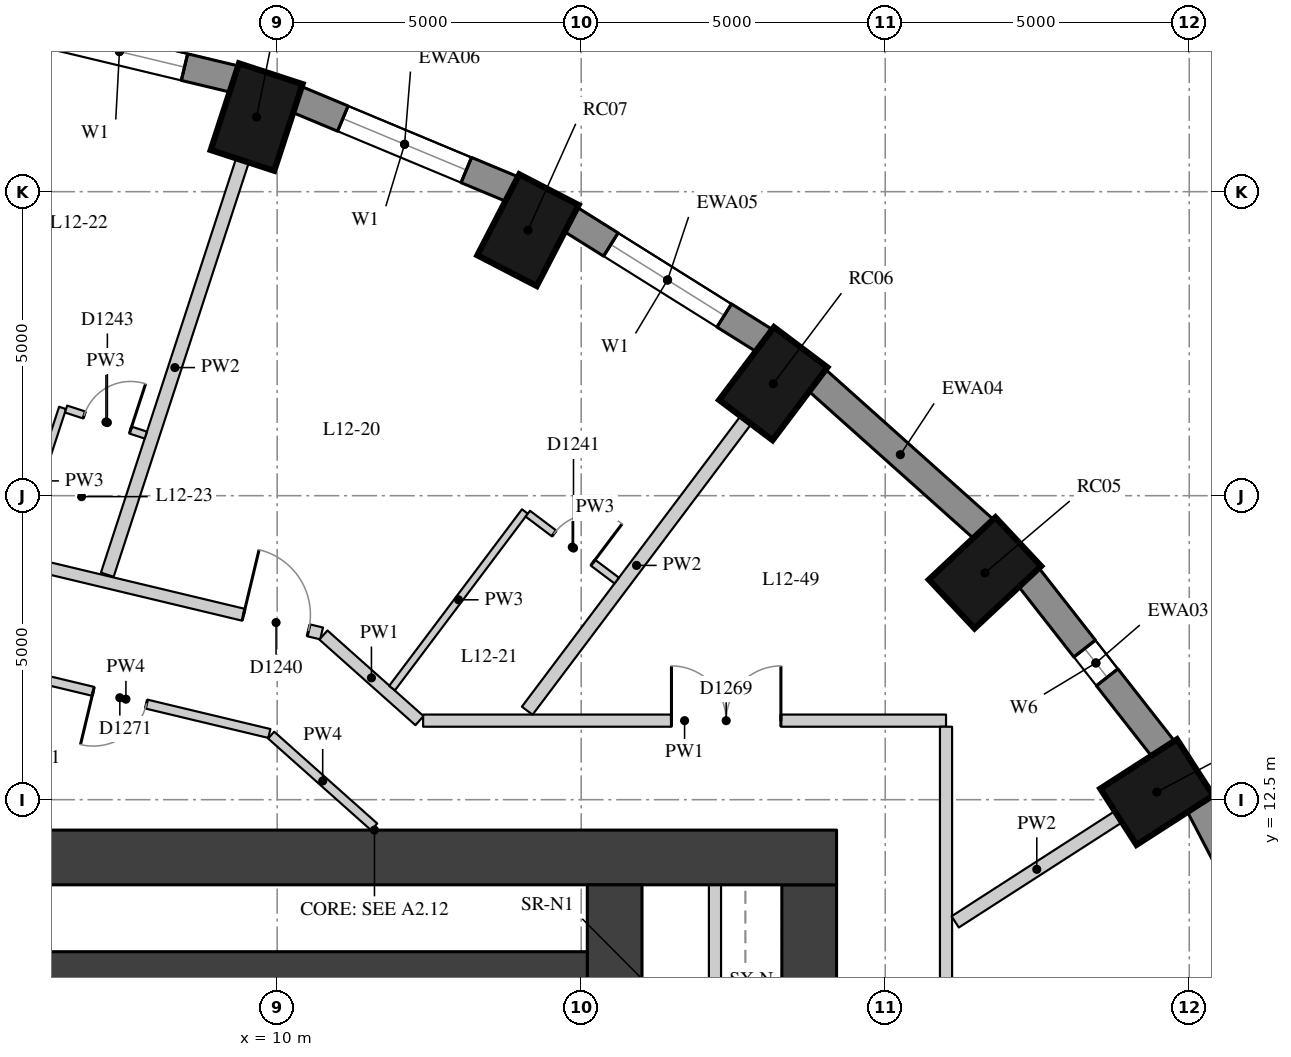
"""IFC4 building model, lengths in metres.
Left out: names, types, materials, properties, quantities, classifications, styles, units other than length and angle.
Written with IfcOpenShell. Run it as: python <this file> out.ifc"""

import sys

from ifc_helpers import new_model, si_unit, direction, frame, frame_2d, origin, origin_2d, place, context, subcontext, project, spatial, rectangle, extrude, element, fill, save


model = new_model("IFC4")
c1 = context("Model", 3, precision=1e-05, world=origin(), true_north=direction((0.0, 1.0)))
c2 = subcontext(c1, "Body", "Model", "MODEL_VIEW")
j1 = project(units=[si_unit("LENGTHUNIT", "METRE"), si_unit("PLANEANGLEUNIT", "RADIAN")], contexts=[c1])
p1 = place(None, origin())
s1 = spatial("IfcSite", under=j1, at=p1, CompositionType="ELEMENT")
p2 = place(p1, origin())
s2 = spatial("IfcBuilding", under=s1, at=p2, CompositionType="ELEMENT")
p3 = place(p2, frame((0.0, 0.0, 48.1)))
s3 = spatial("IfcBuildingStorey", under=s2, at=p3, CompositionType="ELEMENT", Elevation=48.1)
for number, where, z_axis, x_axis in (
    (1, (24.465, 12.625, 0.0), (0.0, 0.0, 1.0), (0.841, 0.541, 0.0)),
    (2, (21.641, 16.23, 0.0), (0.0, 0.0, 1.0), (0.73, 0.683, 0.0)),
    (3, (18.159, 19.343, 0.0), (0.0, 0.0, 1.0), (0.601, 0.799, 0.0)),
    (4, (14.125, 21.867, 0.0), (0.0, 0.0, 1.0), (0.46, 0.888, 0.0)),
    (5, (9.662, 23.727, 0.0), (0.0, 0.0, 1.0), (0.31, 0.951, 0.0)),
):
    element("IfcColumn", number, at=place(p3, frame(where, z_axis=z_axis, x_axis=x_axis)), inside=s3, PredefinedType="COLUMN", context=c2, shape_type="SweptSolid", body=[
        extrude(rectangle(XDim=1.5, YDim=1.1, at=origin_2d()), origin(), (0.0, 0.0, 1.0), 3.3),
    ])
p4 = place(p3, frame((26.786, 9.305, 0.0), z_axis=(0.0, 0.0, 1.0), x_axis=(-0.462492775226, 0.886623050041, 0.0)))
e6 = element("IfcWall", 6, at=p4, inside=s3, PredefinedType="SOLIDWALL", context=c2, shape_type="SweptSolid", body=[
    extrude(rectangle(XDim=3.532, YDim=0.45, at=frame_2d((1.766, 0.0))), origin(), (0.0, 0.0, 1.0), 3.02),
])
p5 = place(p3, frame((24.578, 13.328, 0.0), z_axis=(0.0, 0.0, 1.0), x_axis=(-0.616661975264, 0.787228053529, 0.0)))
e7 = element("IfcWall", 7, at=p5, inside=s3, PredefinedType="SOLIDWALL", context=c2, shape_type="SweptSolid", body=[
    extrude(rectangle(XDim=3.61, YDim=0.45, at=frame_2d((1.805, 0.0))), origin(), (0.0, 0.0, 1.0), 3.02),
])
p6 = place(p5, frame((1.505, 0.0, 0.4)))
e8 = element("IfcOpeningElement", 8, at=p6, cuts=e7, PredefinedType="OPENING", context=c2, shape_type="SweptSolid", body=[
    extrude(rectangle(XDim=0.6, YDim=1.75, at=frame_2d((0.3, 0.875))), frame((0.0, 0.235, 0.0), z_axis=(0.0, -1.0, 0.0), x_axis=(1.0, 0.0, 0.0)), (0.0, 0.0, 1.0), 0.47),
])
p7 = place(p3, frame((21.627, 16.943, 0.0), z_axis=(0.0, 0.0, 1.0), x_axis=(-0.745526233716, 0.66647628228, 0.0)))
e9 = element("IfcWall", 9, at=p7, inside=s3, PredefinedType="SOLIDWALL", context=c2, shape_type="SweptSolid", body=[
    extrude(rectangle(XDim=3.697, YDim=0.45, at=frame_2d((1.848, 0.0))), origin(), (0.0, 0.0, 1.0), 3.02),
])
p8 = place(p3, frame((18.023, 20.044, 0.0), z_axis=(0.0, 0.0, 1.0), x_axis=(-0.847635480093, 0.530579016629, 0.0)))
e10 = element("IfcWall", 10, at=p8, inside=s3, PredefinedType="SOLIDWALL", context=c2, shape_type="SweptSolid", body=[
    extrude(rectangle(XDim=3.782, YDim=0.45, at=frame_2d((1.891, 0.0))), origin(), (0.0, 0.0, 1.0), 3.02),
])
p9 = place(p8, frame((0.791, 0.0, 0.4)))
e11 = element("IfcOpeningElement", 11, at=p9, cuts=e10, PredefinedType="OPENING", context=c2, shape_type="SweptSolid", body=[
    extrude(rectangle(XDim=2.2, YDim=1.75, at=frame_2d((1.1, 0.875))), frame((0.0, 0.235, 0.0), z_axis=(0.0, -1.0, 0.0), x_axis=(1.0, 0.0, 0.0)), (0.0, 0.0, 1.0), 0.47),
])
p10 = place(p3, frame((13.875, 22.537, 0.0), z_axis=(0.0, 0.0, 1.0), x_axis=(-0.923031964282, 0.384723267966, 0.0)))
e12 = element("IfcWall", 12, at=p10, inside=s3, PredefinedType="SOLIDWALL", context=c2, shape_type="SweptSolid", body=[
    extrude(rectangle(XDim=3.856, YDim=0.45, at=frame_2d((1.928, 0.0))), origin(), (0.0, 0.0, 1.0), 3.02),
])
p11 = place(p10, frame((0.828, 0.0, 0.4)))
e13 = element("IfcOpeningElement", 13, at=p11, cuts=e12, PredefinedType="OPENING", context=c2, shape_type="SweptSolid", body=[
    extrude(rectangle(XDim=2.2, YDim=1.75, at=frame_2d((1.1, 0.875))), frame((0.0, 0.235, 0.0), z_axis=(0.0, -1.0, 0.0), x_axis=(1.0, 0.0, 0.0)), (0.0, 0.0, 1.0), 0.47),
])
p12 = place(p3, frame((9.308, 24.35, 0.0), z_axis=(0.0, 0.0, 1.0), x_axis=(-0.972496561493, 0.232917233979, 0.0)))
e14 = element("IfcWall", 14, at=p12, inside=s3, PredefinedType="SOLIDWALL", context=c2, shape_type="SweptSolid", body=[
    extrude(rectangle(XDim=3.911, YDim=0.45, at=frame_2d((1.956, 0.0))), origin(), (0.0, 0.0, 1.0), 3.02),
])
p13 = place(p12, frame((0.855, 0.0, 0.4)))
e15 = element("IfcOpeningElement", 15, at=p13, cuts=e14, PredefinedType="OPENING", context=c2, shape_type="SweptSolid", body=[
    extrude(rectangle(XDim=2.2, YDim=1.75, at=frame_2d((1.1, 0.875))), frame((0.0, 0.235, 0.0), z_axis=(0.0, -1.0, 0.0), x_axis=(1.0, 0.0, 0.0)), (0.0, 0.0, 1.0), 0.47),
])
p14 = place(p3, frame((18.75, -11.1, 0.0), z_axis=(0.0, 0.0, 1.0), x_axis=(0.0, 1.0, 0.0)))
e16 = element("IfcWall", 16, at=p14, inside=s3, PredefinedType="SHEAR", context=c2, shape_type="SweptSolid", body=[
    extrude(rectangle(XDim=22.2, YDim=0.9, at=frame_2d((11.1, 0.0))), origin(), (0.0, 0.0, 1.0), 3.02),
])
p15 = place(p14, frame((15.925, 0.0, 0.0)))
e17 = element("IfcOpeningElement", 17, at=p15, cuts=e16, PredefinedType="OPENING", context=c2, shape_type="SweptSolid", body=[
    extrude(rectangle(XDim=1.5, YDim=2.1, at=frame_2d((0.75, 1.05))), frame((0.0, 0.46, 0.0), z_axis=(0.0, -1.0, 0.0), x_axis=(1.0, 0.0, 0.0)), (0.0, 0.0, 1.0), 0.92),
])
p16 = place(p14, frame((4.525, 0.0, 0.0)))
e18 = element("IfcOpeningElement", 18, at=p16, cuts=e16, PredefinedType="OPENING", context=c2, shape_type="SweptSolid", body=[
    extrude(rectangle(XDim=1.5, YDim=2.1, at=frame_2d((0.75, 1.05))), frame((0.0, 0.46, 0.0), z_axis=(0.0, -1.0, 0.0), x_axis=(1.0, 0.0, 0.0)), (0.0, 0.0, 1.0), 0.92),
])
p17 = place(p3, frame((4.0, 11.55, 0.0), z_axis=(0.0, 0.0, 1.0), x_axis=(1.0, 0.0, 0.0)))
e19 = element("IfcWall", 19, at=p17, inside=s3, PredefinedType="SHEAR", context=c2, shape_type="SweptSolid", body=[
    extrude(rectangle(XDim=15.2, YDim=0.9, at=frame_2d((7.6, 0.0))), origin(), (0.0, 0.0, 1.0), 3.02),
])
p18 = place(p3, frame((15.55, -11.1, 0.0), z_axis=(0.0, 0.0, 1.0), x_axis=(0.0, 1.0, 0.0)))
e20 = element("IfcWall", 20, at=p18, inside=s3, PredefinedType="SHEAR", context=c2, shape_type="SweptSolid", body=[
    extrude(rectangle(XDim=22.2, YDim=0.9, at=frame_2d((11.1, 0.0))), origin(), (0.0, 0.0, 1.0), 3.02),
])
p19 = place(p18, frame((15.6, 0.0, 0.0)))
e21 = element("IfcOpeningElement", 21, at=p19, cuts=e20, PredefinedType="OPENING", context=c2, shape_type="SweptSolid", body=[
    extrude(rectangle(XDim=1.0, YDim=2.1, at=frame_2d((0.5, 1.05))), frame((0.0, 0.46, 0.0), z_axis=(0.0, -1.0, 0.0), x_axis=(1.0, 0.0, 0.0)), (0.0, 0.0, 1.0), 0.92),
])
p20 = place(p18, frame((5.6, 0.0, 0.0)))
e22 = element("IfcOpeningElement", 22, at=p20, cuts=e20, PredefinedType="OPENING", context=c2, shape_type="SweptSolid", body=[
    extrude(rectangle(XDim=1.0, YDim=2.1, at=frame_2d((0.5, 1.05))), frame((0.0, 0.46, 0.0), z_axis=(0.0, -1.0, 0.0), x_axis=(1.0, 0.0, 0.0)), (0.0, 0.0, 1.0), 0.92),
])
p21 = place(p3, frame((4.9, 9.55, 0.0), z_axis=(0.0, 0.0, 1.0), x_axis=(1.0, 0.0, 0.0)))
e23 = element("IfcWall", 23, at=p21, inside=s3, PredefinedType="SHEAR", context=c2, shape_type="SweptSolid", body=[
    extrude(rectangle(XDim=10.2, YDim=0.9, at=frame_2d((5.1, 0.0))), origin(), (0.0, 0.0, 1.0), 3.02),
])
p22 = place(p3, frame((17.2, 6.9, 0.0), z_axis=(0.0, 0.0, 1.0), x_axis=(0.0, 1.0, 0.0)))
e24 = element("IfcWall", 24, at=p22, inside=s3, PredefinedType="PARTITIONING", context=c2, shape_type="SweptSolid", body=[
    extrude(rectangle(XDim=4.2, YDim=0.2, at=frame_2d((2.1, 0.0))), origin(), (0.0, 0.0, 1.0), 3.02),
])
p23 = place(p3, frame((0.098, 17.777, 0.0), z_axis=(0.0, 0.0, 1.0), x_axis=(0.97258196627, -0.232560355362, 0.0)))
e25 = element("IfcWall", 25, at=p23, inside=s3, PredefinedType="PARTITIONING", context=c2, shape_type="SweptSolid", body=[
    extrude(rectangle(XDim=10.933, YDim=0.2, at=frame_2d((5.466, 0.0))), origin(), (0.0, 0.0, 1.0), 3.02),
])
p24 = place(p23, frame((9.613, 0.0, 0.0)))
e26 = element("IfcOpeningElement", 26, at=p24, cuts=e25, PredefinedType="OPENING", context=c2, shape_type="SweptSolid", body=[
    extrude(rectangle(XDim=1.1, YDim=2.1, at=frame_2d((0.55, 1.05))), frame((0.0, 0.11, 0.0), z_axis=(0.0, -1.0, 0.0), x_axis=(1.0, 0.0, 0.0)), (0.0, 0.0, 1.0), 0.22),
])
p25 = place(p23, frame((4.325, 0.0, 0.0)))
e27 = element("IfcOpeningElement", 27, at=p25, cuts=e25, PredefinedType="OPENING", context=c2, shape_type="SweptSolid", body=[
    extrude(rectangle(XDim=1.0, YDim=2.1, at=frame_2d((0.5, 1.05))), frame((0.0, 0.11, 0.0), z_axis=(0.0, -1.0, 0.0), x_axis=(1.0, 0.0, 0.0)), (0.0, 0.0, 1.0), 0.22),
])
p26 = place(p23, frame((1.276, 0.0, 0.0)))
e28 = element("IfcOpeningElement", 28, at=p26, cuts=e25, PredefinedType="OPENING", context=c2, shape_type="SweptSolid", body=[
    extrude(rectangle(XDim=0.9, YDim=2.1, at=frame_2d((0.45, 1.05))), frame((0.0, 0.11, 0.0), z_axis=(0.0, -1.0, 0.0), x_axis=(1.0, 0.0, 0.0)), (0.0, 0.0, 1.0), 0.22),
])
p27 = place(p3, frame((10.76, 15.208, 0.0), z_axis=(0.0, 0.0, 1.0), x_axis=(0.746600460158, -0.665272690626, 0.0)))
e29 = element("IfcWall", 29, at=p27, inside=s3, PredefinedType="PARTITIONING", context=c2, shape_type="SweptSolid", body=[
    extrude(rectangle(XDim=2.116, YDim=0.2, at=frame_2d((1.058, 0.0))), origin(), (0.0, 0.0, 1.0), 3.02),
])
p28 = place(p3, frame((12.4, 13.8, 0.0), z_axis=(0.0, 0.0, 1.0), x_axis=(1.0, 0.0, 0.0)))
e30 = element("IfcWall", 30, at=p28, inside=s3, PredefinedType="PARTITIONING", context=c2, shape_type="SweptSolid", body=[
    extrude(rectangle(XDim=8.6, YDim=0.2, at=frame_2d((4.3, 0.0))), origin(), (0.0, 0.0, 1.0), 3.02),
])
p29 = place(p28, frame((4.084, 0.0, 0.0)))
e31 = element("IfcOpeningElement", 31, at=p29, cuts=e30, PredefinedType="OPENING", context=c2, shape_type="SweptSolid", body=[
    extrude(rectangle(XDim=1.8, YDim=2.1, at=frame_2d((0.9, 1.05))), frame((0.0, 0.11, 0.0), z_axis=(0.0, -1.0, 0.0), x_axis=(1.0, 0.0, 0.0)), (0.0, 0.0, 1.0), 0.22),
])
p30 = place(p3, frame((21.0, 13.7, 0.0), z_axis=(0.0, 0.0, 1.0), x_axis=(0.0, -1.0, 0.0)))
e32 = element("IfcWall", 32, at=p30, inside=s3, PredefinedType="PARTITIONING", context=c2, shape_type="SweptSolid", body=[
    extrude(rectangle(XDim=27.5, YDim=0.2, at=frame_2d((13.75, 0.0))), origin(), (0.0, 0.0, 1.0), 3.02),
])
p31 = place(p30, frame((15.992, 0.0, 0.0)))
e33 = element("IfcOpeningElement", 33, at=p31, cuts=e32, PredefinedType="OPENING", context=c2, shape_type="SweptSolid", body=[
    extrude(rectangle(XDim=1.8, YDim=2.1, at=frame_2d((0.9, 1.05))), frame((0.0, 0.11, 0.0), z_axis=(0.0, -1.0, 0.0), x_axis=(1.0, 0.0, 0.0)), (0.0, 0.0, 1.0), 0.22),
])
p32 = place(p30, frame((7.602, 0.0, 0.0)))
e34 = element("IfcOpeningElement", 34, at=p32, cuts=e32, PredefinedType="OPENING", context=c2, shape_type="SweptSolid", body=[
    extrude(rectangle(XDim=1.8, YDim=2.1, at=frame_2d((0.9, 1.05))), frame((0.0, 0.11, 0.0), z_axis=(0.0, -1.0, 0.0), x_axis=(1.0, 0.0, 0.0)), (0.0, 0.0, 1.0), 0.22),
])
p33 = place(p3, frame((5.154, 14.717, 0.0), z_axis=(0.0, 0.0, 1.0), x_axis=(0.972587058657, -0.232539057651, 0.0)))
e35 = element("IfcWall", 35, at=p33, inside=s3, PredefinedType="PARTITIONING", context=c2, shape_type="SweptSolid", body=[
    extrude(rectangle(XDim=4.851, YDim=0.15, at=frame_2d((2.425, 0.0))), origin(), (0.0, 0.0, 1.0), 3.02),
])
p34 = place(p33, frame((1.872, 0.0, 0.0)))
e36 = element("IfcOpeningElement", 36, at=p34, cuts=e35, PredefinedType="OPENING", context=c2, shape_type="SweptSolid", body=[
    extrude(rectangle(XDim=0.9, YDim=2.1, at=frame_2d((0.45, 1.05))), frame((0.0, 0.085, 0.0), z_axis=(0.0, -1.0, 0.0), x_axis=(1.0, 0.0, 0.0)), (0.0, 0.0, 1.0), 0.17),
])
p35 = place(p3, frame((9.901, 13.562, 0.0), z_axis=(0.0, 0.0, 1.0), x_axis=(0.746696753395, -0.665164610054, 0.0)))
e37 = element("IfcWall", 37, at=p35, inside=s3, PredefinedType="PARTITIONING", context=c2, shape_type="SweptSolid", body=[
    extrude(rectangle(XDim=2.27, YDim=0.15, at=frame_2d((1.135, 0.0))), origin(), (0.0, 0.0, 1.0), 3.02),
])
p36 = place(p3, frame((23.835, 12.219, 0.0), z_axis=(0.0, 0.0, 1.0), x_axis=(-0.840711059677, -0.541483992503, 0.0)))
e38 = element("IfcWall", 38, at=p36, inside=s3, PredefinedType="PARTITIONING", context=c2, shape_type="SweptSolid", body=[
    extrude(rectangle(XDim=3.193, YDim=0.22, at=frame_2d((1.596, 0.0))), origin(), (0.0, 0.0, 1.0), 3.02),
])
p37 = place(p3, frame((17.708, 18.743, 0.0), z_axis=(0.0, 0.0, 1.0), x_axis=(-0.601181461694, -0.799112539081, 0.0)))
e39 = element("IfcWall", 39, at=p37, inside=s3, PredefinedType="PARTITIONING", context=c2, shape_type="SweptSolid", body=[
    extrude(rectangle(XDim=5.981, YDim=0.22, at=frame_2d((2.99, 0.0))), origin(), (0.0, 0.0, 1.0), 3.02),
])
p38 = place(p3, frame((9.429, 23.014, 0.0), z_axis=(0.0, 0.0, 1.0), x_axis=(-0.310212691368, -0.950667179466, 0.0)))
e40 = element("IfcWall", 40, at=p38, inside=s3, PredefinedType="PARTITIONING", context=c2, shape_type="SweptSolid", body=[
    extrude(rectangle(XDim=7.167, YDim=0.22, at=frame_2d((3.583, 0.0))), origin(), (0.0, 0.0, 1.0), 3.02),
])
p39 = place(p3, frame((11.889, 14.336, 0.0), z_axis=(0.0, 0.0, 1.0), x_axis=(0.601160173805, 0.799128553758, 0.0)))
e41 = element("IfcWall", 41, at=p39, inside=s3, PredefinedType="PARTITIONING", context=c2, shape_type="SweptSolid", body=[
    extrude(rectangle(XDim=3.634, YDim=0.12, at=frame_2d((1.817, 0.0))), origin(), (0.0, 0.0, 1.0), 3.02),
])
p40 = place(p3, frame((5.687, 16.543, 0.0), z_axis=(0.0, 0.0, 1.0), x_axis=(0.310246659943, 0.950656094492, 0.0)))
e42 = element("IfcWall", 42, at=p40, inside=s3, PredefinedType="PARTITIONING", context=c2, shape_type="SweptSolid", body=[
    extrude(rectangle(XDim=2.525, YDim=0.12, at=frame_2d((1.263, 0.0))), origin(), (0.0, 0.0, 1.0), 3.02),
])
p41 = place(p3, frame((14.122, 17.204, 0.0), z_axis=(0.0, 0.0, 1.0), x_axis=(0.799134663307, -0.601152052231, 0.0)))
e43 = element("IfcWall", 43, at=p41, inside=s3, PredefinedType="PARTITIONING", context=c2, shape_type="SweptSolid", body=[
    extrude(rectangle(XDim=1.83, YDim=0.12, at=frame_2d((0.915, 0.0))), origin(), (0.0, 0.0, 1.0), 3.02),
])
p42 = place(p41, frame((0.54, 0.0, 0.0)))
e44 = element("IfcOpeningElement", 44, at=p42, cuts=e43, PredefinedType="OPENING", context=c2, shape_type="SweptSolid", body=[
    extrude(rectangle(XDim=0.8, YDim=2.1, at=frame_2d((0.4, 1.05))), frame((0.0, 0.07, 0.0), z_axis=(0.0, -1.0, 0.0), x_axis=(1.0, 0.0, 0.0)), (0.0, 0.0, 1.0), 0.14),
])
p43 = place(p3, frame((6.528, 18.925, 0.0), z_axis=(0.0, 0.0, 1.0), x_axis=(0.950628893115, -0.310329997864, 0.0)))
e45 = element("IfcWall", 45, at=p43, inside=s3, PredefinedType="PARTITIONING", context=c2, shape_type="SweptSolid", body=[
    extrude(rectangle(XDim=1.38, YDim=0.12, at=frame_2d((0.69, 0.0))), origin(), (0.0, 0.0, 1.0), 3.02),
])
p44 = place(p43, frame((0.315, 0.0, 0.0)))
e46 = element("IfcOpeningElement", 46, at=p44, cuts=e45, PredefinedType="OPENING", context=c2, shape_type="SweptSolid", body=[
    extrude(rectangle(XDim=0.8, YDim=2.1, at=frame_2d((0.4, 1.05))), frame((0.0, 0.07, 0.0), z_axis=(0.0, -1.0, 0.0), x_axis=(1.0, 0.0, 0.0)), (0.0, 0.0, 1.0), 0.14),
])
p45 = place(p6, origin())
e47 = element("IfcWindow", 47, at=p45, inside=s3, PartitioningType="SINGLE_PANEL", PredefinedType="WINDOW", context=c2, shape_type="SweptSolid", body=[
    extrude(rectangle(XDim=0.6, YDim=1.75, at=frame_2d((0.3, 0.875))), frame((0.0, 0.035, 0.0), z_axis=(0.0, -1.0, 0.0), x_axis=(1.0, 0.0, 0.0)), (0.0, 0.0, 1.0), 0.06),
])
fill(e8, e47)
p46 = place(p9, origin())
e48 = element("IfcWindow", 48, at=p46, inside=s3, PartitioningType="SINGLE_PANEL", PredefinedType="WINDOW", context=c2, shape_type="SweptSolid", body=[
    extrude(rectangle(XDim=2.2, YDim=1.75, at=frame_2d((1.1, 0.875))), frame((0.0, 0.035, 0.0), z_axis=(0.0, -1.0, 0.0), x_axis=(1.0, 0.0, 0.0)), (0.0, 0.0, 1.0), 0.06),
])
fill(e11, e48)
p47 = place(p11, origin())
e49 = element("IfcWindow", 49, at=p47, inside=s3, PartitioningType="SINGLE_PANEL", PredefinedType="WINDOW", context=c2, shape_type="SweptSolid", body=[
    extrude(rectangle(XDim=2.2, YDim=1.75, at=frame_2d((1.1, 0.875))), frame((0.0, 0.035, 0.0), z_axis=(0.0, -1.0, 0.0), x_axis=(1.0, 0.0, 0.0)), (0.0, 0.0, 1.0), 0.06),
])
fill(e13, e49)
p48 = place(p13, origin())
e50 = element("IfcWindow", 50, at=p48, inside=s3, PartitioningType="SINGLE_PANEL", PredefinedType="WINDOW", context=c2, shape_type="SweptSolid", body=[
    extrude(rectangle(XDim=2.2, YDim=1.75, at=frame_2d((1.1, 0.875))), frame((0.0, 0.035, 0.0), z_axis=(0.0, -1.0, 0.0), x_axis=(1.0, 0.0, 0.0)), (0.0, 0.0, 1.0), 0.06),
])
fill(e15, e50)
p49 = place(p24, origin())
e51 = element("IfcDoor", 51, at=p49, inside=s3, OperationType="SINGLE_SWING_LEFT", PredefinedType="DOOR", context=c2, shape_type="SweptSolid", body=[
    extrude(rectangle(XDim=1.1, YDim=2.1, at=frame_2d((0.55, 1.05))), frame((0.0, 0.025, 0.0), z_axis=(0.0, -1.0, 0.0), x_axis=(1.0, 0.0, 0.0)), (0.0, 0.0, 1.0), 0.05),
])
fill(e26, e51)
p50 = place(p42, origin())
e52 = element("IfcDoor", 52, at=p50, inside=s3, OperationType="SINGLE_SWING_RIGHT", PredefinedType="DOOR", context=c2, shape_type="SweptSolid", body=[
    extrude(rectangle(XDim=0.8, YDim=2.1, at=frame_2d((0.4, 1.05))), frame((0.0, 0.025, 0.0), z_axis=(0.0, -1.0, 0.0), x_axis=(1.0, 0.0, 0.0)), (0.0, 0.0, 1.0), 0.05),
])
fill(e44, e52)
p51 = place(p44, origin())
e53 = element("IfcDoor", 53, at=p51, inside=s3, OperationType="SINGLE_SWING_RIGHT", PredefinedType="DOOR", context=c2, shape_type="SweptSolid", body=[
    extrude(rectangle(XDim=0.8, YDim=2.1, at=frame_2d((0.4, 1.05))), frame((0.0, 0.025, 0.0), z_axis=(0.0, -1.0, 0.0), x_axis=(1.0, 0.0, 0.0)), (0.0, 0.0, 1.0), 0.05),
])
fill(e46, e53)
p52 = place(p29, origin())
e54 = element("IfcDoor", 54, at=p52, inside=s3, OperationType="DOUBLE_DOOR_SINGLE_SWING", PredefinedType="DOOR", context=c2, shape_type="SweptSolid", body=[
    extrude(rectangle(XDim=1.8, YDim=2.1, at=frame_2d((0.9, 1.05))), frame((0.0, 0.025, 0.0), z_axis=(0.0, -1.0, 0.0), x_axis=(1.0, 0.0, 0.0)), (0.0, 0.0, 1.0), 0.05),
])
fill(e31, e54)
p53 = place(p34, origin())
e55 = element("IfcDoor", 55, at=p53, inside=s3, OperationType="SINGLE_SWING_RIGHT", PredefinedType="DOOR", context=c2, shape_type="SweptSolid", body=[
    extrude(rectangle(XDim=0.9, YDim=2.1, at=frame_2d((0.45, 1.05))), frame((0.0, 0.025, 0.0), z_axis=(0.0, -1.0, 0.0), x_axis=(1.0, 0.0, 0.0)), (0.0, 0.0, 1.0), 0.05),
])
fill(e36, e55)
save(model, sys.argv[1])
